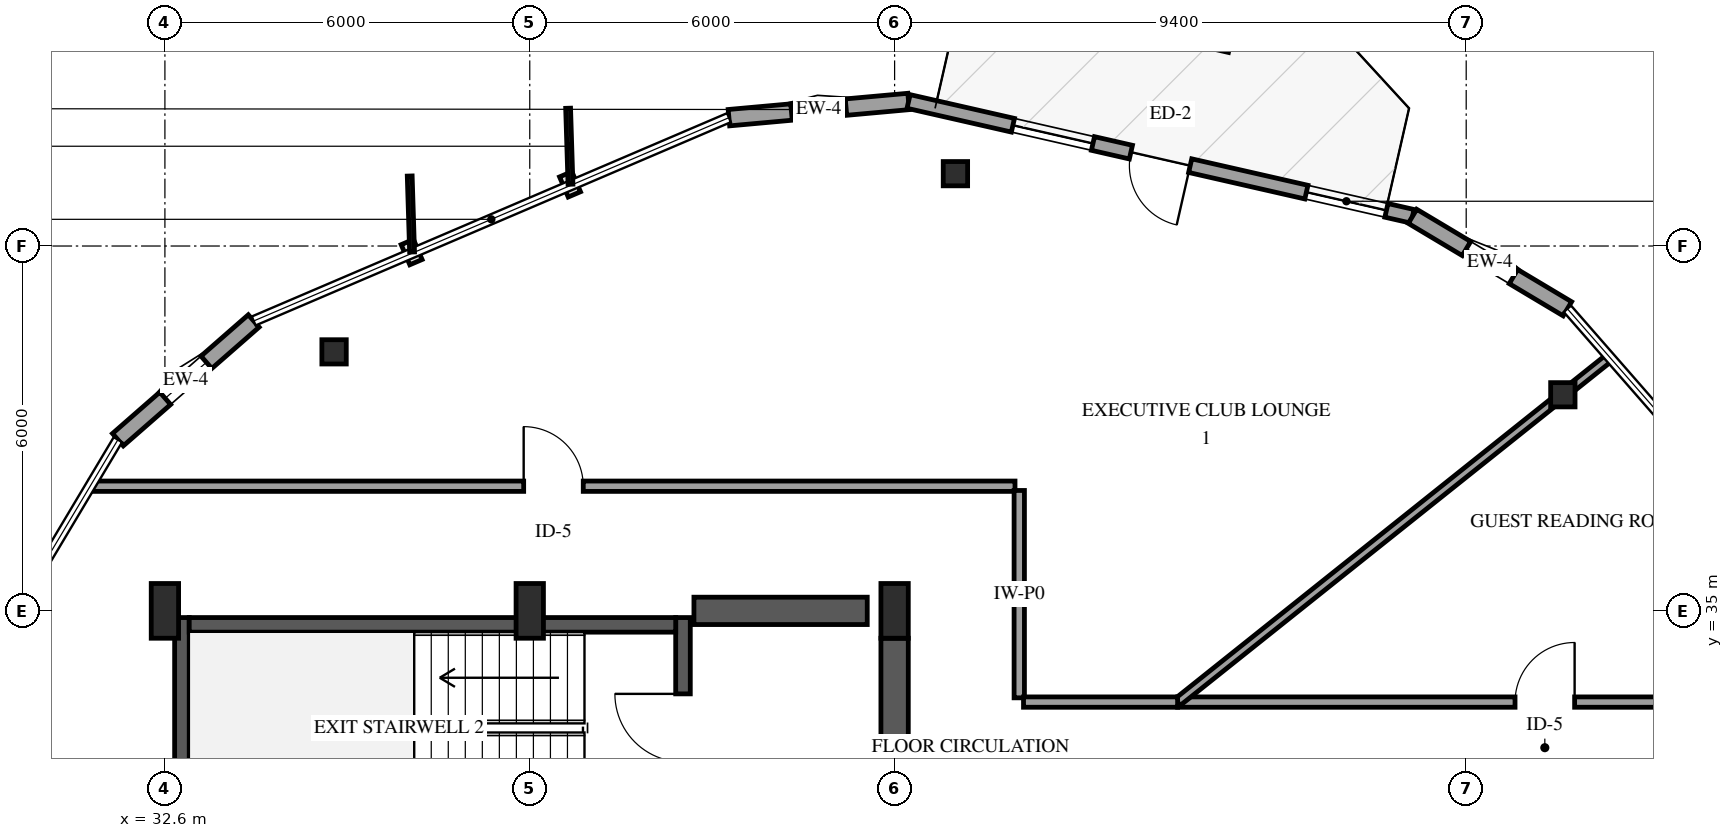
"""IFC4 building model, lengths in metres.
Left out: names, types, materials, properties, quantities, classifications, styles, units other than length and angle.
Written with IfcOpenShell. Run it as: python <this file> out.ifc"""

import sys

from ifc_helpers import new_model, si_unit, direction, frame, frame_2d, origin, origin_2d, place, context, subcontext, project, spatial, rectangle, i_section, extrude, element, fill, save


model = new_model("IFC4")
c1 = context("Model", 3, precision=1e-05, world=origin(), true_north=direction((0.0, 1.0)))
c2 = subcontext(c1, "Body", "Model", "MODEL_VIEW")
j1 = project(units=[si_unit("LENGTHUNIT", "METRE"), si_unit("PLANEANGLEUNIT", "RADIAN")], contexts=[c1])
p1 = place(None, origin())
s1 = spatial("IfcSite", under=j1, at=p1, CompositionType="ELEMENT")
p2 = place(p1, origin())
s2 = spatial("IfcBuilding", under=s1, at=p2, CompositionType="ELEMENT")
p3 = place(p2, frame((0.0, 0.0, 250.0)))
s3 = spatial("IfcBuildingStorey", under=s2, at=p3, CompositionType="ELEMENT", Elevation=250.0)
p4 = place(p3, frame((32.88, 31.26, 0.0), z_axis=(0.0, 0.0, 1.0), x_axis=(0.0, 1.0, 0.0)))
e1 = element("IfcWall", 1, at=p4, inside=s3, PredefinedType="SHEAR", context=c2, shape_type="SweptSolid", body=[
    extrude(rectangle(XDim=3.63, YDim=0.24, at=frame_2d((1.815, 0.0))), origin(), (0.0, 0.0, 1.0), 3.75),
])
p5 = place(p3, frame((41.12, 31.26, 0.0), z_axis=(0.0, 0.0, 1.0), x_axis=(0.0, 1.0, 0.0)))
e2 = element("IfcWall", 2, at=p5, inside=s3, PredefinedType="SHEAR", context=c2, shape_type="SweptSolid", body=[
    extrude(rectangle(XDim=3.63, YDim=0.24, at=frame_2d((1.815, 0.0))), origin(), (0.0, 0.0, 1.0), 3.75),
])
p6 = place(p5, frame((1.255, 0.0, 0.0)))
e3 = element("IfcOpeningElement", 3, at=p6, cuts=e2, PredefinedType="OPENING", context=c2, shape_type="SweptSolid", body=[
    extrude(rectangle(XDim=1.12, YDim=2.15, at=frame_2d((0.56, 1.075))), frame((0.0, 0.13, 0.0), z_axis=(0.0, -1.0, 0.0), x_axis=(1.0, 0.0, 0.0)), (0.0, 0.0, 1.0), 0.26),
])
p7 = place(p3, frame((33.0, 34.77, 0.0), z_axis=(0.0, 0.0, 1.0), x_axis=(1.0, 0.0, 0.0)))
e4 = element("IfcWall", 4, at=p7, inside=s3, PredefinedType="SHEAR", context=c2, shape_type="SweptSolid", body=[
    extrude(rectangle(XDim=8.0, YDim=0.24, at=frame_2d((4.0, 0.0))), origin(), (0.0, 0.0, 1.0), 3.75),
])
p8 = place(p3, frame((41.3, 35.0, 0.0), z_axis=(0.0, 0.0, 1.0), x_axis=(1.0, 0.0, 0.0)))
e5 = element("IfcWall", 5, at=p8, inside=s3, PredefinedType="SHEAR", context=c2, shape_type="SweptSolid", body=[
    extrude(rectangle(XDim=2.85, YDim=0.45, at=frame_2d((1.425, 0.0))), origin(), (0.0, 0.0, 1.0), 3.75),
])
p9 = place(p3, frame((44.6, 29.8, 0.0), z_axis=(0.0, 0.0, 1.0), x_axis=(0.0, 1.0, 0.0)))
e6 = element("IfcWall", 6, at=p9, inside=s3, PredefinedType="SHEAR", context=c2, shape_type="SweptSolid", body=[
    extrude(rectangle(XDim=4.75, YDim=0.45, at=frame_2d((2.375, 0.0))), origin(), (0.0, 0.0, 1.0), 3.75),
])
for number, where, z_axis, x_axis in (
    (7, (32.6, 35.0, 0.0), (0.0, 0.0, 1.0), (1.0, 0.0, 0.0)),
    (8, (38.6, 35.0, 0.0), (0.0, 0.0, 1.0), (1.0, 0.0, 0.0)),
    (9, (44.6, 35.0, 0.0), (0.0, 0.0, 1.0), (1.0, 0.0, 0.0)),
):
    element("IfcColumn", number, at=place(p3, frame(where, z_axis=z_axis, x_axis=x_axis)), inside=s3, PredefinedType="PILASTER", context=c2, shape_type="SweptSolid", body=[
        extrude(rectangle(XDim=0.45, YDim=0.9, at=origin_2d()), origin(), (0.0, 0.0, 1.0), 3.75),
    ])
for number, where, z_axis, x_axis in (
    (10, (55.589, 38.554, 0.0), (0.0, 0.0, 1.0), (1.0, 0.0, 0.0)),
    (11, (45.6, 42.189, 0.0), (0.0, 0.0, 1.0), (1.0, 0.0, 0.0)),
    (12, (35.382, 39.26, 0.0), (0.0, 0.0, 1.0), (1.0, 0.0, 0.0)),
):
    element("IfcColumn", number, at=place(p3, frame(where, z_axis=z_axis, x_axis=x_axis)), inside=s3, PredefinedType="COLUMN", context=c2, shape_type="SweptSolid", body=[
        extrude(i_section(OverallWidth=0.401, OverallDepth=0.399, WebThickness=0.025, FlangeThickness=0.04, FilletRadius=0.038, at=origin_2d()), origin(), (0.0, 0.0, 1.0), 3.75),
    ])
p10 = place(p3, frame((44.83, 43.377, 0.0), z_axis=(0.0, 0.0, 1.0), x_axis=(-0.995946323989, -0.089949539921, 0.0)))
e13 = element("IfcWall", 13, at=p10, inside=s3, PredefinedType="SOLIDWALL", context=c2, shape_type="SweptSolid", body=[
    extrude(rectangle(XDim=2.967, YDim=0.27, at=frame_2d((1.483, 0.0))), origin(), (0.0, 0.0, 1.0), 2.829),
])
p11 = place(p10, frame((1.033, 0.0, 0.75)))
e14 = element("IfcOpeningElement", 14, at=p11, cuts=e13, PredefinedType="OPENING", context=c2, shape_type="SweptSolid", body=[
    extrude(rectangle(XDim=0.9, YDim=1.5, at=frame_2d((0.45, 0.75))), frame((0.0, 0.145, 0.0), z_axis=(0.0, -1.0, 0.0), x_axis=(1.0, 0.0, 0.0)), (0.0, 0.0, 1.0), 0.29),
])
p12 = place(p3, frame((53.117, 41.488, 0.0), z_axis=(0.0, 0.0, 1.0), x_axis=(-0.974994695917, 0.222228132635, 0.0)))
e15 = element("IfcWall", 15, at=p12, inside=s3, PredefinedType="SOLIDWALL", context=c2, shape_type="SweptSolid", body=[
    extrude(rectangle(XDim=8.5, YDim=0.23, at=frame_2d((4.25, 0.0))), origin(), (0.0, 0.0, 1.0), 2.829),
])
p13 = place(p12, frame((3.75, 0.0, 0.0)))
e16 = element("IfcOpeningElement", 16, at=p13, cuts=e15, PredefinedType="OPENING", context=c2, shape_type="SweptSolid", body=[
    extrude(rectangle(XDim=1.0, YDim=2.15, at=frame_2d((0.5, 1.075))), frame((0.0, 0.125, 0.0), z_axis=(0.0, -1.0, 0.0), x_axis=(1.0, 0.0, 0.0)), (0.0, 0.0, 1.0), 0.25),
])
p14 = place(p12, frame((0.44, 0.0, 0.72)))
e17 = element("IfcOpeningElement", 17, at=p14, cuts=e15, PredefinedType="OPENING", context=c2, shape_type="SweptSolid", body=[
    extrude(rectangle(XDim=1.35, YDim=1.65, at=frame_2d((0.675, 0.825))), frame((0.0, 0.125, 0.0), z_axis=(0.0, -1.0, 0.0), x_axis=(1.0, 0.0, 0.0)), (0.0, 0.0, 1.0), 0.25),
])
p15 = place(p12, frame((5.39, 0.0, 0.72)))
e18 = element("IfcOpeningElement", 18, at=p15, cuts=e15, PredefinedType="OPENING", context=c2, shape_type="SweptSolid", body=[
    extrude(rectangle(XDim=1.35, YDim=1.65, at=frame_2d((0.675, 0.825))), frame((0.0, 0.125, 0.0), z_axis=(0.0, -1.0, 0.0), x_axis=(1.0, 0.0, 0.0)), (0.0, 0.0, 1.0), 0.25),
])
p16 = place(p3, frame((34.06, 39.767, 0.0), z_axis=(0.0, 0.0, 1.0), x_axis=(-0.75288250817, -0.658154942921, 0.0)))
e19 = element("IfcWall", 19, at=p16, inside=s3, PredefinedType="SOLIDWALL", context=c2, shape_type="SweptSolid", body=[
    extrude(rectangle(XDim=2.967, YDim=0.27, at=frame_2d((1.483, 0.0))), origin(), (0.0, 0.0, 1.0), 2.829),
])
p17 = place(p16, frame((1.033, 0.0, 0.75)))
e20 = element("IfcOpeningElement", 20, at=p17, cuts=e19, PredefinedType="OPENING", context=c2, shape_type="SweptSolid", body=[
    extrude(rectangle(XDim=0.9, YDim=1.5, at=frame_2d((0.45, 0.75))), frame((0.0, 0.145, 0.0), z_axis=(0.0, -1.0, 0.0), x_axis=(1.0, 0.0, 0.0)), (0.0, 0.0, 1.0), 0.29),
])
p18 = place(p3, frame((55.664, 39.968, 0.0), z_axis=(0.0, 0.0, 1.0), x_axis=(-0.858609177154, 0.512630745183, 0.0)))
e21 = element("IfcWall", 21, at=p18, inside=s3, PredefinedType="SOLIDWALL", context=c2, shape_type="SweptSolid", body=[
    extrude(rectangle(XDim=2.967, YDim=0.27, at=frame_2d((1.483, 0.0))), origin(), (0.0, 0.0, 1.0), 2.829),
])
p19 = place(p18, frame((1.033, 0.0, 0.75)))
e22 = element("IfcOpeningElement", 22, at=p19, cuts=e21, PredefinedType="OPENING", context=c2, shape_type="SweptSolid", body=[
    extrude(rectangle(XDim=0.9, YDim=1.5, at=frame_2d((0.45, 0.75))), frame((0.0, 0.145, 0.0), z_axis=(0.0, -1.0, 0.0), x_axis=(1.0, 0.0, 0.0)), (0.0, 0.0, 1.0), 0.29),
])
p20 = place(p3, frame((31.37, 37.05, 0.0), z_axis=(0.0, 0.0, 1.0), x_axis=(1.0, 0.0, 0.0)))
e23 = element("IfcWall", 23, at=p20, inside=s3, PredefinedType="PARTITIONING", context=c2, shape_type="SweptSolid", body=[
    extrude(rectangle(XDim=15.21, YDim=0.17, at=frame_2d((7.605, 0.0))), origin(), (0.0, 0.0, 1.0), 3.45),
])
p21 = place(p20, frame((7.13, 0.0, 0.0)))
e24 = element("IfcOpeningElement", 24, at=p21, cuts=e23, PredefinedType="OPENING", context=c2, shape_type="SweptSolid", body=[
    extrude(rectangle(XDim=0.98, YDim=2.15, at=frame_2d((0.49, 1.075))), frame((0.0, 0.095, 0.0), z_axis=(0.0, -1.0, 0.0), x_axis=(1.0, 0.0, 0.0)), (0.0, 0.0, 1.0), 0.19),
])
p22 = place(p3, frame((49.254, 33.5, 0.0), z_axis=(0.0, 0.0, 1.0), x_axis=(1.0, 0.0, 0.0)))
e25 = element("IfcWall", 25, at=p22, inside=s3, PredefinedType="PARTITIONING", context=c2, shape_type="SweptSolid", body=[
    extrude(rectangle(XDim=12.047, YDim=0.17, at=frame_2d((6.023, 0.0))), origin(), (0.0, 0.0, 1.0), 2.828),
])
p23 = place(p22, frame((5.549, 0.0, 0.0)))
e26 = element("IfcOpeningElement", 26, at=p23, cuts=e25, PredefinedType="OPENING", context=c2, shape_type="SweptSolid", body=[
    extrude(rectangle(XDim=0.98, YDim=2.15, at=frame_2d((0.49, 1.075))), frame((0.0, 0.095, 0.0), z_axis=(0.0, -1.0, 0.0), x_axis=(1.0, 0.0, 0.0)), (0.0, 0.0, 1.0), 0.19),
])
p24 = place(p3, frame((49.254, 33.5, 0.0), z_axis=(0.0, 0.0, 1.0), x_axis=(0.781716904538, 0.623633450963, 0.0)))
e27 = element("IfcWall", 27, at=p24, inside=s3, PredefinedType="PARTITIONING", context=c2, shape_type="SweptSolid", body=[
    extrude(rectangle(XDim=9.092, YDim=0.14, at=frame_2d((4.546, 0.0))), origin(), (0.0, 0.0, 1.0), 3.45),
])
p25 = place(p3, frame((46.65, 36.98, 0.0), z_axis=(0.0, 0.0, 1.0), x_axis=(0.0, -1.0, 0.0)))
e28 = element("IfcWall", 28, at=p25, inside=s3, PredefinedType="PARTITIONING", context=c2, shape_type="SweptSolid", body=[
    extrude(rectangle(XDim=3.41, YDim=0.17, at=frame_2d((1.705, 0.0))), origin(), (0.0, 0.0, 1.0), 3.45),
])
p26 = place(p3, frame((46.72, 33.5, 0.0), z_axis=(0.0, 0.0, 1.0), x_axis=(1.0, 0.0, 0.0)))
e29 = element("IfcWall", 29, at=p26, inside=s3, PredefinedType="PARTITIONING", context=c2, shape_type="SweptSolid", body=[
    extrude(rectangle(XDim=2.534, YDim=0.17, at=frame_2d((1.267, 0.0))), origin(), (0.0, 0.0, 1.0), 3.45),
])
p27 = place(p11, origin())
e30 = element("IfcWindow", 30, at=p27, inside=s3, PartitioningType="SINGLE_PANEL", PredefinedType="WINDOW", context=c2, shape_type="SweptSolid", body=[
    extrude(rectangle(XDim=0.9, YDim=1.5, at=frame_2d((0.45, 0.75))), frame((0.0, 0.03, 0.0), z_axis=(0.0, -1.0, 0.0), x_axis=(1.0, 0.0, 0.0)), (0.0, 0.0, 1.0), 0.06),
])
fill(e14, e30)
p28 = place(p13, origin())
e31 = element("IfcDoor", 31, at=p28, inside=s3, OperationType="SINGLE_SWING_LEFT", PredefinedType="DOOR", context=c2, shape_type="SweptSolid", body=[
    extrude(rectangle(XDim=1.0, YDim=2.15, at=frame_2d((0.5, 1.075))), frame((0.0, 0.025, 0.0), z_axis=(0.0, -1.0, 0.0), x_axis=(1.0, 0.0, 0.0)), (0.0, 0.0, 1.0), 0.05),
])
fill(e16, e31)
p29 = place(p14, origin())
e32 = element("IfcWindow", 32, at=p29, inside=s3, PartitioningType="SINGLE_PANEL", PredefinedType="WINDOW", context=c2, shape_type="SweptSolid", body=[
    extrude(rectangle(XDim=1.35, YDim=1.65, at=frame_2d((0.675, 0.825))), frame((0.0, 0.03, 0.0), z_axis=(0.0, -1.0, 0.0), x_axis=(1.0, 0.0, 0.0)), (0.0, 0.0, 1.0), 0.06),
])
fill(e17, e32)
p30 = place(p15, origin())
e33 = element("IfcWindow", 33, at=p30, inside=s3, PartitioningType="SINGLE_PANEL", PredefinedType="WINDOW", context=c2, shape_type="SweptSolid", body=[
    extrude(rectangle(XDim=1.35, YDim=1.65, at=frame_2d((0.675, 0.825))), frame((0.0, 0.03, 0.0), z_axis=(0.0, -1.0, 0.0), x_axis=(1.0, 0.0, 0.0)), (0.0, 0.0, 1.0), 0.06),
])
fill(e18, e33)
p31 = place(p17, origin())
e34 = element("IfcWindow", 34, at=p31, inside=s3, PartitioningType="SINGLE_PANEL", PredefinedType="WINDOW", context=c2, shape_type="SweptSolid", body=[
    extrude(rectangle(XDim=0.9, YDim=1.5, at=frame_2d((0.45, 0.75))), frame((0.0, 0.03, 0.0), z_axis=(0.0, -1.0, 0.0), x_axis=(1.0, 0.0, 0.0)), (0.0, 0.0, 1.0), 0.06),
])
fill(e20, e34)
p32 = place(p19, origin())
e35 = element("IfcWindow", 35, at=p32, inside=s3, PartitioningType="SINGLE_PANEL", PredefinedType="WINDOW", context=c2, shape_type="SweptSolid", body=[
    extrude(rectangle(XDim=0.9, YDim=1.5, at=frame_2d((0.45, 0.75))), frame((0.0, 0.03, 0.0), z_axis=(0.0, -1.0, 0.0), x_axis=(1.0, 0.0, 0.0)), (0.0, 0.0, 1.0), 0.06),
])
fill(e22, e35)
p33 = place(p6, origin())
e36 = element("IfcDoor", 36, at=p33, inside=s3, OperationType="SINGLE_SWING_RIGHT", PredefinedType="DOOR", context=c2, shape_type="SweptSolid", body=[
    extrude(rectangle(XDim=1.12, YDim=2.15, at=frame_2d((0.56, 1.075))), frame((0.0, 0.025, 0.0), z_axis=(0.0, -1.0, 0.0), x_axis=(1.0, 0.0, 0.0)), (0.0, 0.0, 1.0), 0.05),
])
fill(e3, e36)
p34 = place(p21, origin())
e37 = element("IfcDoor", 37, at=p34, inside=s3, OperationType="SINGLE_SWING_LEFT", PredefinedType="DOOR", context=c2, shape_type="SweptSolid", body=[
    extrude(rectangle(XDim=0.98, YDim=2.15, at=frame_2d((0.49, 1.075))), frame((0.0, 0.025, 0.0), z_axis=(0.0, -1.0, 0.0), x_axis=(1.0, 0.0, 0.0)), (0.0, 0.0, 1.0), 0.05),
])
fill(e24, e37)
p35 = place(p23, origin())
e38 = element("IfcDoor", 38, at=p35, inside=s3, OperationType="SINGLE_SWING_RIGHT", PredefinedType="DOOR", context=c2, shape_type="SweptSolid", body=[
    extrude(rectangle(XDim=0.98, YDim=2.15, at=frame_2d((0.49, 1.075))), frame((0.0, 0.025, 0.0), z_axis=(0.0, -1.0, 0.0), x_axis=(1.0, 0.0, 0.0)), (0.0, 0.0, 1.0), 0.05),
])
fill(e26, e38)
save(model, sys.argv[1])
